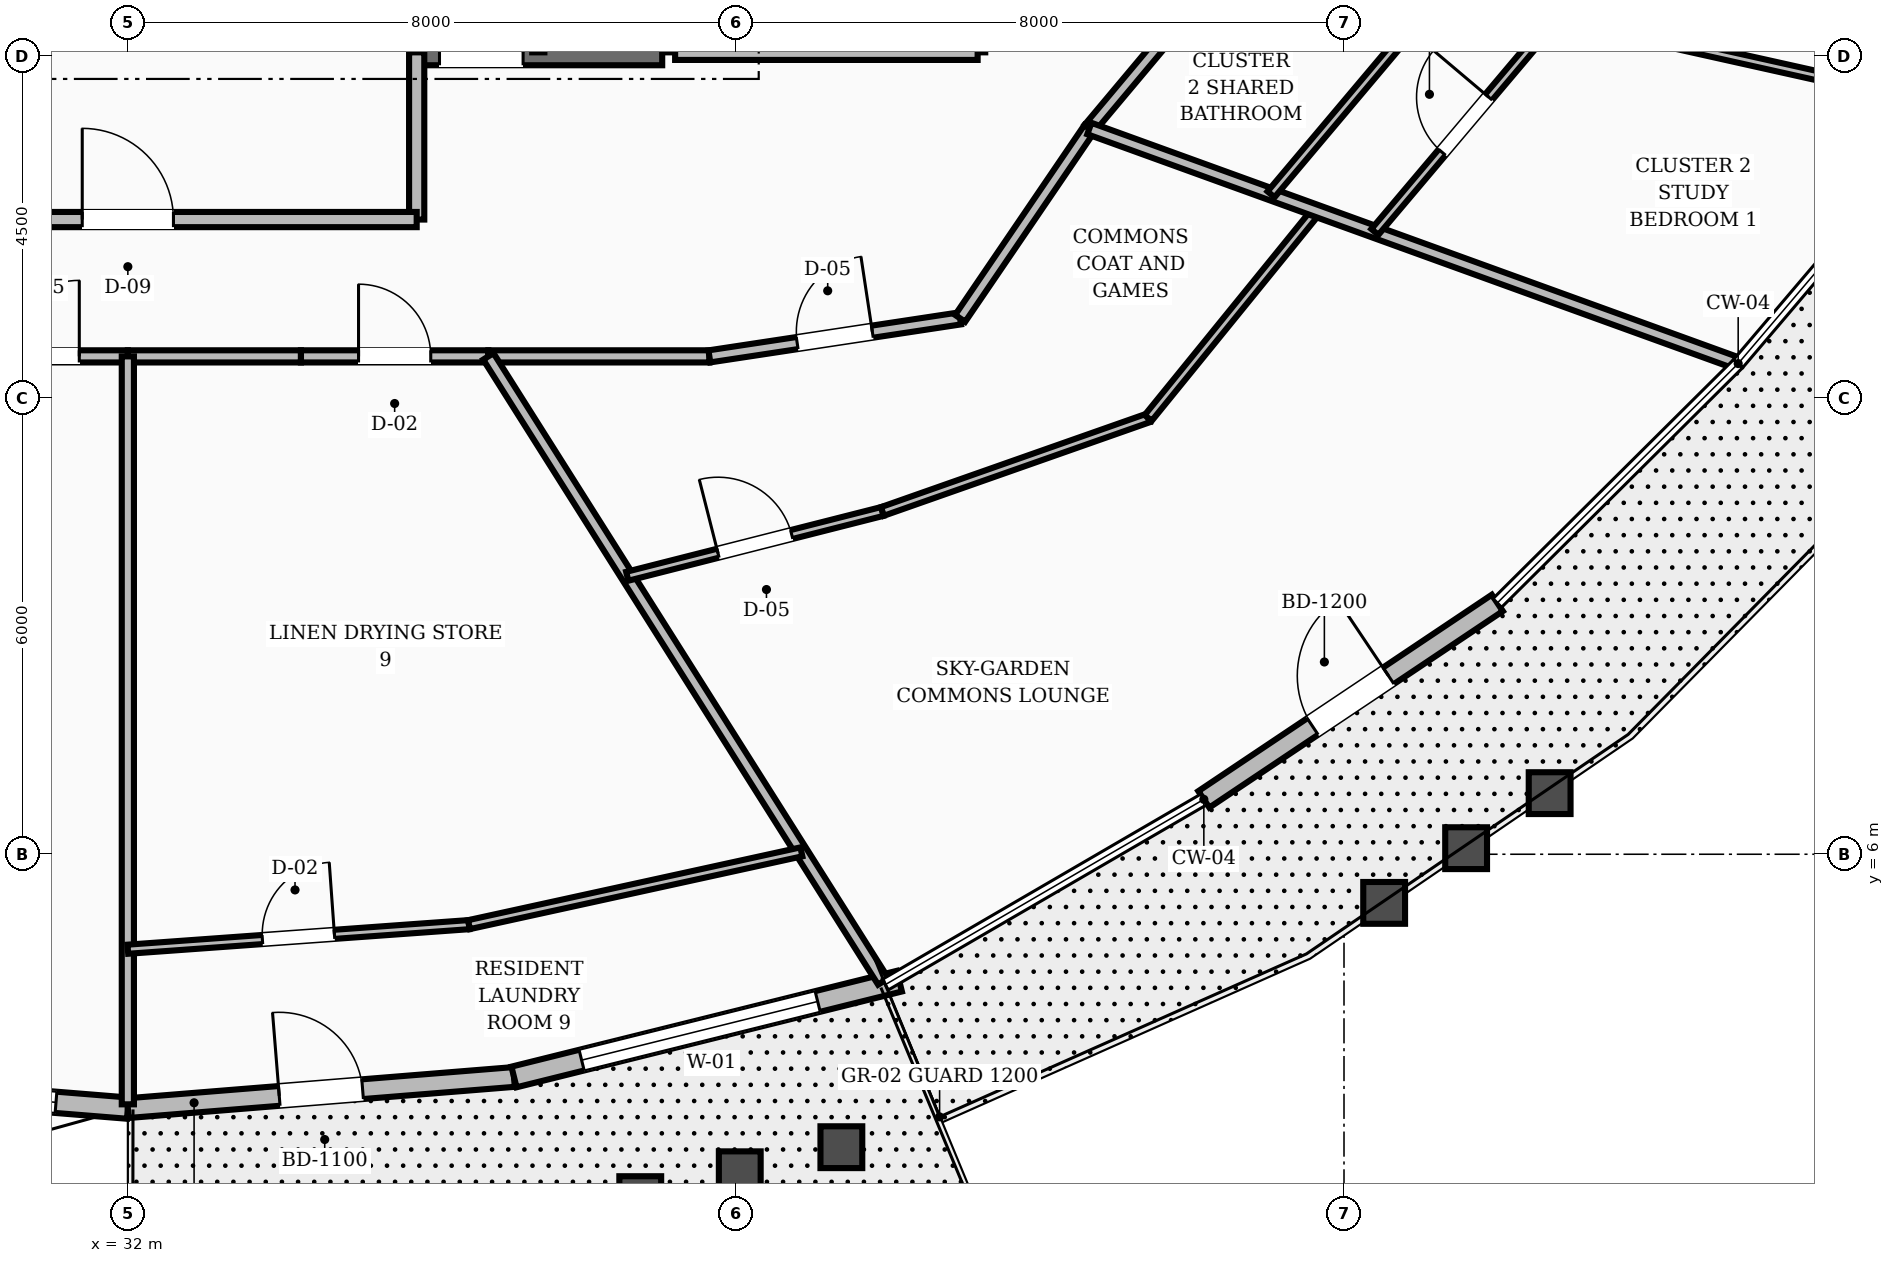
"""IFC4 building model, lengths in metres.
Left out: names, types, materials, properties, quantities, classifications, styles, units other than length and angle.
Written with IfcOpenShell. Run it as: python <this file> out.ifc"""

import sys

from ifc_helpers import new_model, si_unit, direction, frame, frame_2d, origin, place, context, subcontext, project, spatial, rectangle, extrude, element, fill, save


model = new_model("IFC4")
c1 = context("Model", 3, precision=1e-05, world=origin(), true_north=direction((0.0, 1.0)))
c2 = subcontext(c1, "Body", "Model", "MODEL_VIEW")
j1 = project(units=[si_unit("LENGTHUNIT", "METRE"), si_unit("PLANEANGLEUNIT", "RADIAN")], contexts=[c1])
p1 = place(None, origin())
s1 = spatial("IfcSite", under=j1, at=p1, CompositionType="ELEMENT")
p2 = place(p1, origin())
s2 = spatial("IfcBuilding", under=s1, at=p2, CompositionType="ELEMENT")
p3 = place(p2, frame((0.0, 0.0, 174.8)))
s3 = spatial("IfcBuildingStorey", under=s2, at=p3, CompositionType="ELEMENT", Elevation=174.8)
p4 = place(p3, frame((35.8, 16.55, 0.0), z_axis=(0.0, 0.0, 1.0), x_axis=(1.0, 0.0, 0.0)))
e1 = element("IfcWall", 1, at=p4, inside=s3, PredefinedType="SHEAR", context=c2, shape_type="SweptSolid", body=[
    extrude(rectangle(XDim=3.23, YDim=0.34, at=frame_2d((1.615, 0.0))), origin(), (0.0, 0.0, 1.0), 3.6),
])
p5 = place(p4, frame((0.3, 0.0, 0.0)))
e2 = element("IfcOpeningElement", 2, at=p5, cuts=e1, PredefinedType="OPENING", context=c2, shape_type="SweptSolid", body=[
    extrude(rectangle(XDim=1.1, YDim=2.1, at=frame_2d((0.55, 1.05))), frame((0.0, 0.18, 0.0), z_axis=(0.0, -1.0, 0.0), x_axis=(1.0, 0.0, 0.0)), (0.0, 0.0, 1.0), 0.36),
])
p6 = place(p3, frame((26.92, 3.07, 0.0), z_axis=(0.0, 0.0, 1.0), x_axis=(0.996756522082, -0.080476305128, 0.0)))
e3 = element("IfcWall", 3, at=p6, inside=s3, PredefinedType="STANDARD", context=c2, shape_type="SweptSolid", body=[
    extrude(rectangle(XDim=5.097, YDim=0.28, at=frame_2d((2.548, 0.0))), origin(), (0.0, 0.0, 1.0), 2.82),
])
p7 = place(p6, frame((0.948, 0.0, 0.8)))
e4 = element("IfcOpeningElement", 4, at=p7, cuts=e3, PredefinedType="OPENING", context=c2, shape_type="SweptSolid", body=[
    extrude(rectangle(XDim=3.2, YDim=1.65, at=frame_2d((1.6, 0.825))), frame((0.0, 0.15, 0.0), z_axis=(0.0, -1.0, 0.0), x_axis=(1.0, 0.0, 0.0)), (0.0, 0.0, 1.0), 0.3),
])
p8 = place(p3, frame((32.0, 2.66, 0.0), z_axis=(0.0, 0.0, 1.0), x_axis=(0.996756522082, 0.080476305128, 0.0)))
e5 = element("IfcWall", 5, at=p8, inside=s3, PredefinedType="STANDARD", context=c2, shape_type="SweptSolid", body=[
    extrude(rectangle(XDim=5.097, YDim=0.26, at=frame_2d((2.548, 0.0))), origin(), (0.0, 0.0, 1.0), 2.82),
])
p9 = place(p8, frame((1.998, 0.0, 0.0)))
e6 = element("IfcOpeningElement", 6, at=p9, cuts=e5, PredefinedType="OPENING", context=c2, shape_type="SweptSolid", body=[
    extrude(rectangle(XDim=1.1, YDim=2.15, at=frame_2d((0.55, 1.075))), frame((0.0, 0.14, 0.0), z_axis=(0.0, -1.0, 0.0), x_axis=(1.0, 0.0, 0.0)), (0.0, 0.0, 1.0), 0.28),
])
p10 = place(p3, frame((37.08, 3.07, 0.0), z_axis=(0.0, 0.0, 1.0), x_axis=(0.970466017287, 0.241237868691, 0.0)))
e7 = element("IfcWall", 7, at=p10, inside=s3, PredefinedType="STANDARD", context=c2, shape_type="SweptSolid", body=[
    extrude(rectangle(XDim=5.224, YDim=0.28, at=frame_2d((2.612, 0.0))), origin(), (0.0, 0.0, 1.0), 2.82),
])
p11 = place(p10, frame((0.917, 0.0, 0.8)))
e8 = element("IfcOpeningElement", 8, at=p11, cuts=e7, PredefinedType="OPENING", context=c2, shape_type="SweptSolid", body=[
    extrude(rectangle(XDim=3.2, YDim=1.65, at=frame_2d((1.6, 0.825))), frame((0.0, 0.15, 0.0), z_axis=(0.0, -1.0, 0.0), x_axis=(1.0, 0.0, 0.0)), (0.0, 0.0, 1.0), 0.3),
])
p12 = place(p3, frame((46.156, 6.722, 0.0), z_axis=(0.0, 0.0, 1.0), x_axis=(0.831038385186, 0.556215068429, 0.0)))
e9 = element("IfcWall", 9, at=p12, inside=s3, PredefinedType="STANDARD", context=c2, shape_type="SweptSolid", body=[
    extrude(rectangle(XDim=4.646, YDim=0.26, at=frame_2d((2.323, 0.0))), origin(), (0.0, 0.0, 1.0), 2.82),
])
p13 = place(p12, frame((1.723, 0.0, 0.0)))
e10 = element("IfcOpeningElement", 10, at=p13, cuts=e9, PredefinedType="OPENING", context=c2, shape_type="SweptSolid", body=[
    extrude(rectangle(XDim=1.2, YDim=2.15, at=frame_2d((0.6, 1.075))), frame((0.0, 0.14, 0.0), z_axis=(0.0, -1.0, 0.0), x_axis=(1.0, 0.0, 0.0)), (0.0, 0.0, 1.0), 0.28),
])
p14 = place(p3, frame((39.2, 16.55, 0.0), z_axis=(0.0, 0.0, 1.0), x_axis=(1.0, 0.0, 0.0)))
e11 = element("IfcWall", 11, at=p14, inside=s3, PredefinedType="SOLIDWALL", context=c2, shape_type="SweptSolid", body=[
    extrude(rectangle(XDim=3.98, YDim=0.2, at=frame_2d((1.99, 0.0))), origin(), (0.0, 0.0, 1.0), 2.8),
])
p15 = place(p3, frame((35.8, 14.35, 0.0), z_axis=(0.0, 0.0, 1.0), x_axis=(0.0, 1.0, 0.0)))
e12 = element("IfcWall", 12, at=p15, inside=s3, PredefinedType="SOLIDWALL", context=c2, shape_type="SweptSolid", body=[
    extrude(rectangle(XDim=2.2, YDim=0.2, at=frame_2d((1.1, 0.0))), origin(), (0.0, 0.0, 1.0), 2.8),
])
p16 = place(p3, frame((28.2, 14.35, 0.0), z_axis=(0.0, 0.0, 1.0), x_axis=(1.0, 0.0, 0.0)))
e13 = element("IfcWall", 13, at=p16, inside=s3, PredefinedType="SOLIDWALL", context=c2, shape_type="SweptSolid", body=[
    extrude(rectangle(XDim=7.6, YDim=0.2, at=frame_2d((3.8, 0.0))), origin(), (0.0, 0.0, 1.0), 2.8),
])
p17 = place(p16, frame((3.2, 0.0, 0.0)))
e14 = element("IfcOpeningElement", 14, at=p17, cuts=e13, PredefinedType="OPENING", context=c2, shape_type="SweptSolid", body=[
    extrude(rectangle(XDim=1.2, YDim=2.1, at=frame_2d((0.6, 1.05))), frame((0.0, 0.11, 0.0), z_axis=(0.0, -1.0, 0.0), x_axis=(1.0, 0.0, 0.0)), (0.0, 0.0, 1.0), 0.22),
])
p18 = place(p3, frame((29.722, 12.55, 0.0), z_axis=(0.0, 0.0, 1.0), x_axis=(1.0, 0.0, 0.0)))
e15 = element("IfcWall", 15, at=p18, inside=s3, PredefinedType="SOLIDWALL", context=c2, shape_type="SweptSolid", body=[
    extrude(rectangle(XDim=2.278, YDim=0.16, at=frame_2d((1.139, 0.0))), origin(), (0.0, 0.0, 1.0), 2.8),
])
p19 = place(p18, frame((0.639, 0.0, 0.0)))
e16 = element("IfcOpeningElement", 16, at=p19, cuts=e15, PredefinedType="OPENING", context=c2, shape_type="SweptSolid", body=[
    extrude(rectangle(XDim=1.0, YDim=2.1, at=frame_2d((0.5, 1.05))), frame((0.0, 0.09, 0.0), z_axis=(0.0, -1.0, 0.0), x_axis=(1.0, 0.0, 0.0)), (0.0, 0.0, 1.0), 0.18),
])
p20 = place(p3, frame((32.0, 12.55, 0.0), z_axis=(0.0, 0.0, 1.0), x_axis=(1.0, 0.0, 0.0)))
e17 = element("IfcWall", 17, at=p20, inside=s3, PredefinedType="SOLIDWALL", context=c2, shape_type="SweptSolid", body=[
    extrude(rectangle(XDim=2.278, YDim=0.16, at=frame_2d((1.139, 0.0))), origin(), (0.0, 0.0, 1.0), 2.8),
])
p21 = place(p3, frame((34.278, 12.55, 0.0), z_axis=(0.0, 0.0, 1.0), x_axis=(1.0, 0.0, 0.0)))
e18 = element("IfcWall", 18, at=p21, inside=s3, PredefinedType="SOLIDWALL", context=c2, shape_type="SweptSolid", body=[
    extrude(rectangle(XDim=2.465, YDim=0.16, at=frame_2d((1.232, 0.0))), origin(), (0.0, 0.0, 1.0), 2.8),
])
p22 = place(p21, frame((0.758, 0.0, 0.0)))
e19 = element("IfcOpeningElement", 19, at=p22, cuts=e18, PredefinedType="OPENING", context=c2, shape_type="SweptSolid", body=[
    extrude(rectangle(XDim=0.95, YDim=2.1, at=frame_2d((0.475, 1.05))), frame((0.0, 0.09, 0.0), z_axis=(0.0, -1.0, 0.0), x_axis=(1.0, 0.0, 0.0)), (0.0, 0.0, 1.0), 0.18),
])
p23 = place(p3, frame((36.743, 12.55, 0.0), z_axis=(0.0, 0.0, 1.0), x_axis=(1.0, 0.0, 0.0)))
e20 = element("IfcWall", 20, at=p23, inside=s3, PredefinedType="SOLIDWALL", context=c2, shape_type="SweptSolid", body=[
    extrude(rectangle(XDim=2.908, YDim=0.16, at=frame_2d((1.454, 0.0))), origin(), (0.0, 0.0, 1.0), 2.8),
])
p24 = place(p3, frame((39.651, 12.55, 0.0), z_axis=(0.0, 0.0, 1.0), x_axis=(0.988710906508, 0.149835721217, 0.0)))
e21 = element("IfcWall", 21, at=p24, inside=s3, PredefinedType="SOLIDWALL", context=c2, shape_type="SweptSolid", body=[
    extrude(rectangle(XDim=3.337, YDim=0.16, at=frame_2d((1.668, 0.0))), origin(), (0.0, 0.0, 1.0), 2.8),
])
p25 = place(p24, frame((1.168, 0.0, 0.0)))
e22 = element("IfcOpeningElement", 22, at=p25, cuts=e21, PredefinedType="OPENING", context=c2, shape_type="SweptSolid", body=[
    extrude(rectangle(XDim=1.0, YDim=2.1, at=frame_2d((0.5, 1.05))), frame((0.0, 0.09, 0.0), z_axis=(0.0, -1.0, 0.0), x_axis=(1.0, 0.0, 0.0)), (0.0, 0.0, 1.0), 0.18),
])
p26 = place(p3, frame((42.95, 13.05, 0.0), z_axis=(0.0, 0.0, 1.0), x_axis=(0.562674669208, 0.826678423955, 0.0)))
e23 = element("IfcWall", 23, at=p26, inside=s3, PredefinedType="SOLIDWALL", context=c2, shape_type="SweptSolid", body=[
    extrude(rectangle(XDim=3.021, YDim=0.16, at=frame_2d((1.511, 0.0))), origin(), (0.0, 0.0, 1.0), 2.8),
])
p27 = place(p3, frame((44.65, 15.548, 0.0), z_axis=(0.0, 0.0, 1.0), x_axis=(0.642665742791, 0.76614668507, 0.0)))
e24 = element("IfcWall", 24, at=p27, inside=s3, PredefinedType="SOLIDWALL", context=c2, shape_type="SweptSolid", body=[
    extrude(rectangle(XDim=3.112, YDim=0.16, at=frame_2d((1.556, 0.0))), origin(), (0.0, 0.0, 1.0), 2.8),
])
p28 = place(p3, frame((36.743, 12.55, 0.0), z_axis=(0.0, 0.0, 1.0), x_axis=(0.534145959156, -0.845392272449, 0.0)))
e25 = element("IfcWall", 25, at=p28, inside=s3, PredefinedType="SOLIDWALL", context=c2, shape_type="SweptSolid", body=[
    extrude(rectangle(XDim=9.727, YDim=0.16, at=frame_2d((4.864, 0.0))), origin(), (0.0, 0.0, 1.0), 2.8),
])
p29 = place(p3, frame((38.571, 9.657, 0.0), z_axis=(0.0, 0.0, 1.0), x_axis=(0.969181367877, 0.246348282235, 0.0)))
e26 = element("IfcWall", 26, at=p29, inside=s3, PredefinedType="PARTITIONING", context=c2, shape_type="SweptSolid", body=[
    extrude(rectangle(XDim=3.464, YDim=0.12, at=frame_2d((1.732, 0.0))), origin(), (0.0, 0.0, 1.0), 2.8),
])
p30 = place(p29, frame((1.232, 0.0, 0.0)))
e27 = element("IfcOpeningElement", 27, at=p30, cuts=e26, PredefinedType="OPENING", context=c2, shape_type="SweptSolid", body=[
    extrude(rectangle(XDim=1.0, YDim=2.1, at=frame_2d((0.5, 1.05))), frame((0.0, 0.07, 0.0), z_axis=(0.0, -1.0, 0.0), x_axis=(1.0, 0.0, 0.0)), (0.0, 0.0, 1.0), 0.14),
])
p31 = place(p3, frame((41.927, 10.51, 0.0), z_axis=(0.0, 0.0, 1.0), x_axis=(0.943364325331, 0.331758571394, 0.0)))
e28 = element("IfcWall", 28, at=p31, inside=s3, PredefinedType="PARTITIONING", context=c2, shape_type="SweptSolid", body=[
    extrude(rectangle(XDim=3.706, YDim=0.12, at=frame_2d((1.853, 0.0))), origin(), (0.0, 0.0, 1.0), 2.8),
])
p32 = place(p3, frame((45.424, 11.74, 0.0), z_axis=(0.0, 0.0, 1.0), x_axis=(0.630511474319, 0.776179928079, 0.0)))
e29 = element("IfcWall", 29, at=p32, inside=s3, PredefinedType="PARTITIONING", context=c2, shape_type="SweptSolid", body=[
    extrude(rectangle(XDim=3.511, YDim=0.12, at=frame_2d((1.756, 0.0))), origin(), (0.0, 0.0, 1.0), 2.8),
])
p33 = place(p3, frame((44.65, 15.548, 0.0), z_axis=(0.0, 0.0, 1.0), x_axis=(0.940209575336, -0.340596468636, 0.0)))
e30 = element("IfcWall", 30, at=p33, inside=s3, PredefinedType="SOLIDWALL", context=c2, shape_type="SweptSolid", body=[
    extrude(rectangle(XDim=9.029, YDim=0.16, at=frame_2d((4.514, 0.0))), origin(), (0.0, 0.0, 1.0), 2.8),
])
p34 = place(p3, frame((47.04, 14.682, 0.0), z_axis=(0.0, 0.0, 1.0), x_axis=(0.644463857784, 0.764634772954, 0.0)))
e31 = element("IfcWall", 31, at=p34, inside=s3, PredefinedType="PARTITIONING", context=c2, shape_type="SweptSolid", body=[
    extrude(rectangle(XDim=3.482, YDim=0.12, at=frame_2d((1.741, 0.0))), origin(), (0.0, 0.0, 1.0), 2.8),
])
p35 = place(p3, frame((48.406, 14.187, 0.0), z_axis=(0.0, 0.0, 1.0), x_axis=(0.645325713634, 0.763907535846, 0.0)))
e32 = element("IfcWall", 32, at=p35, inside=s3, PredefinedType="PARTITIONING", context=c2, shape_type="SweptSolid", body=[
    extrude(rectangle(XDim=3.694, YDim=0.12, at=frame_2d((1.847, 0.0))), origin(), (0.0, 0.0, 1.0), 2.8),
])
p36 = place(p35, frame((1.372, 0.0, 0.0)))
e33 = element("IfcOpeningElement", 33, at=p36, cuts=e32, PredefinedType="OPENING", context=c2, shape_type="SweptSolid", body=[
    extrude(rectangle(XDim=0.95, YDim=2.1, at=frame_2d((0.475, 1.05))), frame((0.0, 0.07, 0.0), z_axis=(0.0, -1.0, 0.0), x_axis=(1.0, 0.0, 0.0)), (0.0, 0.0, 1.0), 0.14),
])
p37 = place(p3, frame((50.789, 17.009, 0.0), z_axis=(0.0, 0.0, 1.0), x_axis=(0.976023513378, -0.217665112806, 0.0)))
e34 = element("IfcWall", 34, at=p37, inside=s3, PredefinedType="PARTITIONING", context=c2, shape_type="SweptSolid", body=[
    extrude(rectangle(XDim=5.348, YDim=0.12, at=frame_2d((2.674, 0.0))), origin(), (0.0, 0.0, 1.0), 2.8),
])
p38 = place(p3, frame((32.0, 12.55, 0.0), z_axis=(0.0, 0.0, 1.0), x_axis=(0.0, -1.0, 0.0)))
e35 = element("IfcWall", 35, at=p38, inside=s3, PredefinedType="SOLIDWALL", context=c2, shape_type="SweptSolid", body=[
    extrude(rectangle(XDim=9.84, YDim=0.16, at=frame_2d((4.92, 0.0))), origin(), (0.0, 0.0, 1.0), 2.8),
])
p39 = place(p3, frame((32.0, 4.75, 0.0), z_axis=(0.0, 0.0, 1.0), x_axis=(0.997412216748, 0.071894852964, 0.0)))
e36 = element("IfcWall", 36, at=p39, inside=s3, PredefinedType="PARTITIONING", context=c2, shape_type="SweptSolid", body=[
    extrude(rectangle(XDim=4.5, YDim=0.12, at=frame_2d((2.25, 0.0))), origin(), (0.0, 0.0, 1.0), 2.8),
])
p40 = place(p39, frame((1.775, 0.0, 0.0)))
e37 = element("IfcOpeningElement", 37, at=p40, cuts=e36, PredefinedType="OPENING", context=c2, shape_type="SweptSolid", body=[
    extrude(rectangle(XDim=0.95, YDim=2.1, at=frame_2d((0.475, 1.05))), frame((0.0, 0.07, 0.0), z_axis=(0.0, -1.0, 0.0), x_axis=(1.0, 0.0, 0.0)), (0.0, 0.0, 1.0), 0.14),
])
p41 = place(p3, frame((36.488, 5.074, 0.0), z_axis=(0.0, 0.0, 1.0), x_axis=(0.976859798757, 0.213880652639, 0.0)))
e38 = element("IfcWall", 38, at=p41, inside=s3, PredefinedType="PARTITIONING", context=c2, shape_type="SweptSolid", body=[
    extrude(rectangle(XDim=4.477, YDim=0.12, at=frame_2d((2.238, 0.0))), origin(), (0.0, 0.0, 1.0), 2.8),
])
p42 = place(p7, origin())
e39 = element("IfcWindow", 39, at=p42, inside=s3, PartitioningType="SINGLE_PANEL", PredefinedType="WINDOW", context=c2, shape_type="SweptSolid", body=[
    extrude(rectangle(XDim=3.2, YDim=1.65, at=frame_2d((1.6, 0.825))), frame((0.0, 0.03, 0.0), z_axis=(0.0, -1.0, 0.0), x_axis=(1.0, 0.0, 0.0)), (0.0, 0.0, 1.0), 0.06),
])
fill(e4, e39)
p43 = place(p9, origin())
e40 = element("IfcDoor", 40, at=p43, inside=s3, OperationType="SINGLE_SWING_LEFT", PredefinedType="DOOR", context=c2, shape_type="SweptSolid", body=[
    extrude(rectangle(XDim=1.1, YDim=2.15, at=frame_2d((0.55, 1.075))), frame((0.0, 0.025, 0.0), z_axis=(0.0, -1.0, 0.0), x_axis=(1.0, 0.0, 0.0)), (0.0, 0.0, 1.0), 0.05),
])
fill(e6, e40)
p44 = place(p11, origin())
e41 = element("IfcWindow", 41, at=p44, inside=s3, PartitioningType="SINGLE_PANEL", PredefinedType="WINDOW", context=c2, shape_type="SweptSolid", body=[
    extrude(rectangle(XDim=3.2, YDim=1.65, at=frame_2d((1.6, 0.825))), frame((0.0, 0.03, 0.0), z_axis=(0.0, -1.0, 0.0), x_axis=(1.0, 0.0, 0.0)), (0.0, 0.0, 1.0), 0.06),
])
fill(e8, e41)
p45 = place(p13, origin())
e42 = element("IfcDoor", 42, at=p45, inside=s3, OperationType="SINGLE_SWING_RIGHT", PredefinedType="DOOR", context=c2, shape_type="SweptSolid", body=[
    extrude(rectangle(XDim=1.2, YDim=2.15, at=frame_2d((0.6, 1.075))), frame((0.0, 0.025, 0.0), z_axis=(0.0, -1.0, 0.0), x_axis=(1.0, 0.0, 0.0)), (0.0, 0.0, 1.0), 0.05),
])
fill(e10, e42)
p46 = place(p5, origin())
e43 = element("IfcDoor", 43, at=p46, inside=s3, OperationType="SINGLE_SWING_RIGHT", PredefinedType="DOOR", context=c2, shape_type="SweptSolid", body=[
    extrude(rectangle(XDim=1.1, YDim=2.1, at=frame_2d((0.55, 1.05))), frame((0.0, 0.025, 0.0), z_axis=(0.0, -1.0, 0.0), x_axis=(1.0, 0.0, 0.0)), (0.0, 0.0, 1.0), 0.05),
])
fill(e2, e43)
p47 = place(p17, origin())
e44 = element("IfcDoor", 44, at=p47, inside=s3, OperationType="SINGLE_SWING_LEFT", PredefinedType="DOOR", context=c2, shape_type="SweptSolid", body=[
    extrude(rectangle(XDim=1.2, YDim=2.1, at=frame_2d((0.6, 1.05))), frame((0.0, 0.025, 0.0), z_axis=(0.0, -1.0, 0.0), x_axis=(1.0, 0.0, 0.0)), (0.0, 0.0, 1.0), 0.05),
])
fill(e14, e44)
p48 = place(p25, origin())
e45 = element("IfcDoor", 45, at=p48, inside=s3, OperationType="SINGLE_SWING_RIGHT", PredefinedType="DOOR", context=c2, shape_type="SweptSolid", body=[
    extrude(rectangle(XDim=1.0, YDim=2.1, at=frame_2d((0.5, 1.05))), frame((0.0, 0.025, 0.0), z_axis=(0.0, -1.0, 0.0), x_axis=(1.0, 0.0, 0.0)), (0.0, 0.0, 1.0), 0.05),
])
fill(e22, e45)
p49 = place(p30, origin())
e46 = element("IfcDoor", 46, at=p49, inside=s3, OperationType="SINGLE_SWING_LEFT", PredefinedType="DOOR", context=c2, shape_type="SweptSolid", body=[
    extrude(rectangle(XDim=1.0, YDim=2.1, at=frame_2d((0.5, 1.05))), frame((0.0, 0.025, 0.0), z_axis=(0.0, -1.0, 0.0), x_axis=(1.0, 0.0, 0.0)), (0.0, 0.0, 1.0), 0.05),
])
fill(e27, e46)
p50 = place(p36, origin())
e47 = element("IfcDoor", 47, at=p50, inside=s3, OperationType="SINGLE_SWING_RIGHT", PredefinedType="DOOR", context=c2, shape_type="SweptSolid", body=[
    extrude(rectangle(XDim=0.95, YDim=2.1, at=frame_2d((0.475, 1.05))), frame((0.0, 0.025, 0.0), z_axis=(0.0, -1.0, 0.0), x_axis=(1.0, 0.0, 0.0)), (0.0, 0.0, 1.0), 0.05),
])
fill(e33, e47)
p51 = place(p19, origin())
e48 = element("IfcDoor", 48, at=p51, inside=s3, OperationType="SINGLE_SWING_RIGHT", PredefinedType="DOOR", context=c2, shape_type="SweptSolid", body=[
    extrude(rectangle(XDim=1.0, YDim=2.1, at=frame_2d((0.5, 1.05))), frame((0.0, 0.025, 0.0), z_axis=(0.0, -1.0, 0.0), x_axis=(1.0, 0.0, 0.0)), (0.0, 0.0, 1.0), 0.05),
])
fill(e16, e48)
p52 = place(p22, origin())
e49 = element("IfcDoor", 49, at=p52, inside=s3, OperationType="SINGLE_SWING_LEFT", PredefinedType="DOOR", context=c2, shape_type="SweptSolid", body=[
    extrude(rectangle(XDim=0.95, YDim=2.1, at=frame_2d((0.475, 1.05))), frame((0.0, 0.025, 0.0), z_axis=(0.0, -1.0, 0.0), x_axis=(1.0, 0.0, 0.0)), (0.0, 0.0, 1.0), 0.05),
])
fill(e19, e49)
p53 = place(p40, origin())
e50 = element("IfcDoor", 50, at=p53, inside=s3, OperationType="SINGLE_SWING_RIGHT", PredefinedType="DOOR", context=c2, shape_type="SweptSolid", body=[
    extrude(rectangle(XDim=0.95, YDim=2.1, at=frame_2d((0.475, 1.05))), frame((0.0, 0.025, 0.0), z_axis=(0.0, -1.0, 0.0), x_axis=(1.0, 0.0, 0.0)), (0.0, 0.0, 1.0), 0.05),
])
fill(e37, e50)
save(model, sys.argv[1])
